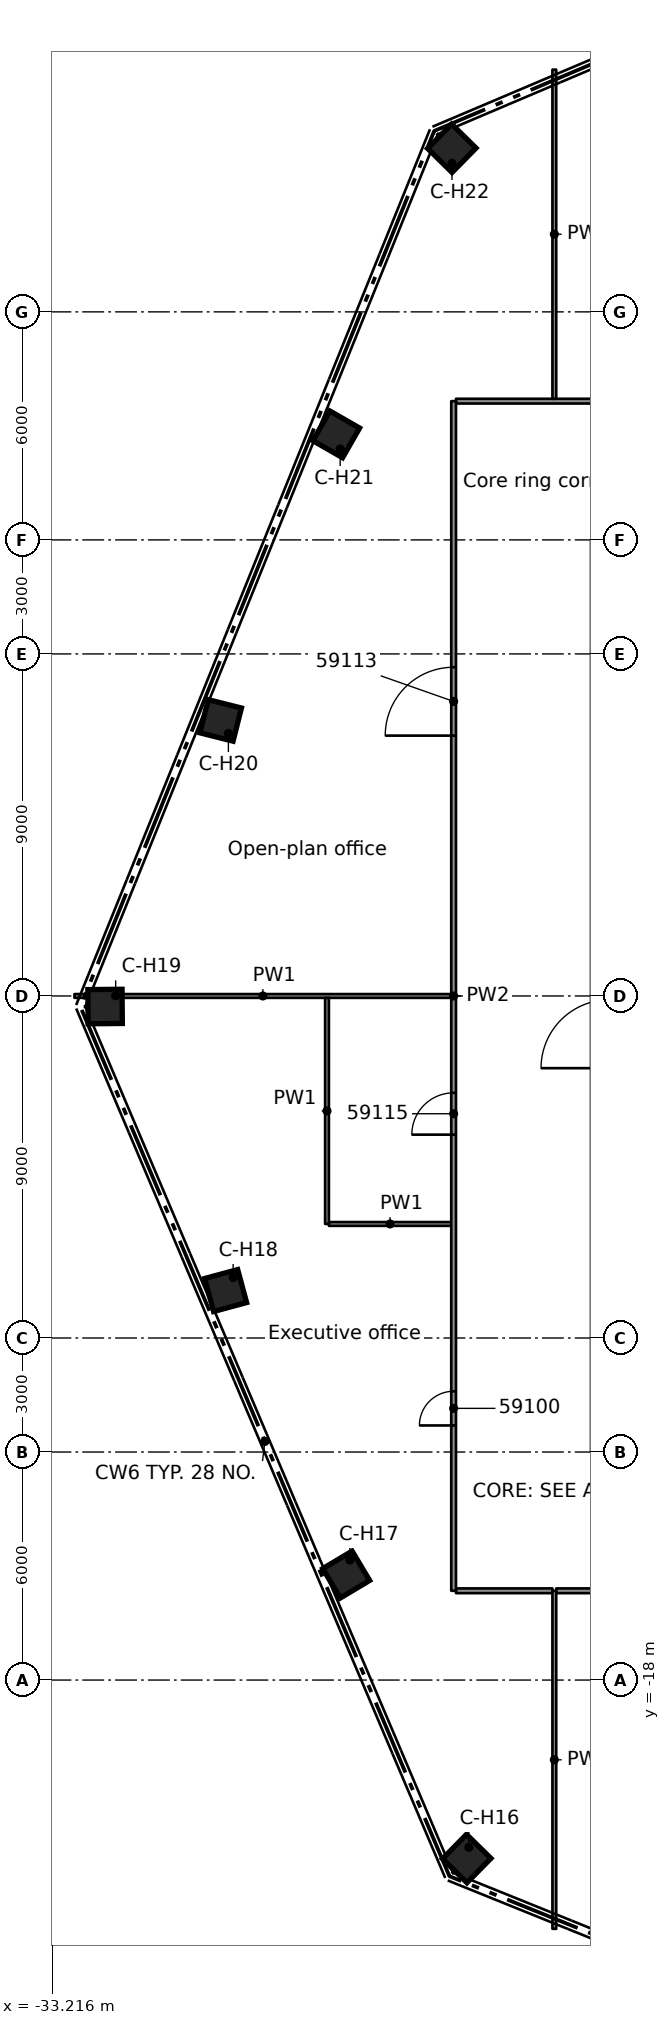
"""IFC4 building model, lengths in metres.
Left out: names, types, materials, properties, quantities, classifications, styles, units other than length and angle.
Written with IfcOpenShell. Run it as: python <this file> out.ifc"""

import sys

from ifc_helpers import new_model, si_unit, direction, frame, frame_2d, origin, origin_2d, place, context, subcontext, project, spatial, rectangle, extrude, element, fill, save


model = new_model("IFC4")
c1 = context("Model", 3, precision=1e-05, world=origin(), true_north=direction((0.0, 1.0)))
c2 = subcontext(c1, "Body", "Model", "MODEL_VIEW")
j1 = project(units=[si_unit("LENGTHUNIT", "METRE"), si_unit("PLANEANGLEUNIT", "RADIAN")], contexts=[c1])
p1 = place(None, origin())
s1 = spatial("IfcSite", under=j1, at=p1, CompositionType="ELEMENT")
p2 = place(p1, origin())
s2 = spatial("IfcBuilding", under=s1, at=p2, CompositionType="ELEMENT")
p3 = place(p2, frame((0.0, 0.0, 289.4)))
s3 = spatial("IfcBuildingStorey", under=s2, at=p3, CompositionType="ELEMENT", Elevation=289.4)
for number, where, z_axis, x_axis in (
    (1, (-22.305, -22.697, 0.0), (0.0, 0.0, 1.0), (-0.701, -0.713, 0.0)),
    (2, (-25.477, -15.224, 0.0), (0.0, 0.0, 1.0), (-0.858, -0.513, 0.0)),
    (3, (-28.649, -7.751, 0.0), (0.0, 0.0, 1.0), (-0.965, -0.261, 0.0)),
    (4, (-31.821, -0.278, 0.0), (0.0, 0.0, 1.0), (-1.0, -0.009, 0.0)),
    (5, (-28.78, 7.25, 0.0), (0.0, 0.0, 1.0), (-0.97, 0.244, 0.0)),
    (6, (-25.739, 14.777, 0.0), (0.0, 0.0, 1.0), (-0.867, 0.498, 0.0)),
    (7, (-22.697, 22.305, 0.0), (0.0, 0.0, 1.0), (-0.713, 0.701, 0.0)),
):
    element("IfcColumn", number, at=place(p3, frame(where, z_axis=z_axis, x_axis=x_axis)), inside=s3, PredefinedType="COLUMN", context=c2, shape_type="SweptSolid", body=[
        extrude(rectangle(XDim=0.9, YDim=0.9, at=origin_2d()), origin(), (0.0, 0.0, 1.0), 3.5),
    ])
p4 = place(p3, frame((-12.311, -15.651, 0.0), z_axis=(0.0, 0.0, 1.0), x_axis=(-1.0, 0.0, 0.0)))
e8 = element("IfcWall", 8, at=p4, inside=s3, PredefinedType="PARTITIONING", context=c2, shape_type="SweptSolid", body=[
    extrude(rectangle(XDim=7.639, YDim=0.125, at=frame_2d((3.819, 0.0))), origin(), (0.0, 0.0, 1.0), 3.15),
])
p5 = place(p4, frame((2.949, 0.0, 0.0)))
e9 = element("IfcOpeningElement", 9, at=p5, cuts=e8, PredefinedType="OPENING", context=c2, shape_type="SweptSolid", body=[
    extrude(rectangle(XDim=1.8, YDim=2.1, at=frame_2d((0.9, 1.05))), frame((0.0, 0.073, 0.0), z_axis=(0.0, -1.0, 0.0), x_axis=(1.0, 0.0, 0.0)), (0.0, 0.0, 1.0), 0.145),
])
p6 = place(p3, frame((-22.587, -15.651, 0.0), z_axis=(0.0, 0.0, 1.0), x_axis=(1.0, 0.0, 0.0)))
e10 = element("IfcWall", 10, at=p6, inside=s3, PredefinedType="PARTITIONING", context=c2, shape_type="SweptSolid", body=[
    extrude(rectangle(XDim=2.537, YDim=0.125, at=frame_2d((1.269, 0.0))), origin(), (0.0, 0.0, 1.0), 3.15),
])
p7 = place(p3, frame((-25.932, -5.999, 0.0), z_axis=(0.0, 0.0, 1.0), x_axis=(1.0, 0.0, 0.0)))
e11 = element("IfcWall", 11, at=p7, inside=s3, PredefinedType="PARTITIONING", context=c2, shape_type="SweptSolid", body=[
    extrude(rectangle(XDim=3.22, YDim=0.1, at=frame_2d((1.61, 0.0))), origin(), (0.0, 0.0, 1.0), 3.15),
])
p8 = place(p3, frame((-32.627, 0.0, 0.0), z_axis=(0.0, 0.0, 1.0), x_axis=(1.0, 0.0, 0.0)))
e12 = element("IfcWall", 12, at=p8, inside=s3, PredefinedType="PARTITIONING", context=c2, shape_type="SweptSolid", body=[
    extrude(rectangle(XDim=9.915, YDim=0.1, at=frame_2d((4.958, 0.0))), origin(), (0.0, 0.0, 1.0), 3.15),
])
p9 = place(p3, frame((-22.587, 15.651, 0.0), z_axis=(0.0, 0.0, 1.0), x_axis=(1.0, 0.0, 0.0)))
e13 = element("IfcWall", 13, at=p9, inside=s3, PredefinedType="PARTITIONING", context=c2, shape_type="SweptSolid", body=[
    extrude(rectangle(XDim=10.996, YDim=0.125, at=frame_2d((5.498, 0.0))), origin(), (0.0, 0.0, 1.0), 3.15),
])
p10 = place(p9, frame((5.938, 0.0, 0.0)))
e14 = element("IfcOpeningElement", 14, at=p10, cuts=e13, PredefinedType="OPENING", context=c2, shape_type="SweptSolid", body=[
    extrude(rectangle(XDim=1.8, YDim=2.1, at=frame_2d((0.9, 1.05))), frame((0.0, 0.073, 0.0), z_axis=(0.0, -1.0, 0.0), x_axis=(1.0, 0.0, 0.0)), (0.0, 0.0, 1.0), 0.145),
])
p11 = place(p3, frame((-20.0, -24.546, 0.0), z_axis=(0.0, 0.0, 1.0), x_axis=(0.0, 1.0, 0.0)))
e15 = element("IfcWall", 15, at=p11, inside=s3, PredefinedType="PARTITIONING", context=c2, shape_type="SweptSolid", body=[
    extrude(rectangle(XDim=8.895, YDim=0.1, at=frame_2d((4.448, 0.0))), origin(), (0.0, 0.0, 1.0), 3.15),
])
p12 = place(p3, frame((-20.0, 15.713, 0.0), z_axis=(0.0, 0.0, 1.0), x_axis=(0.0, 1.0, 0.0)))
e16 = element("IfcWall", 16, at=p12, inside=s3, PredefinedType="PARTITIONING", context=c2, shape_type="SweptSolid", body=[
    extrude(rectangle(XDim=8.661, YDim=0.1, at=frame_2d((4.331, 0.0))), origin(), (0.0, 0.0, 1.0), 3.15),
])
p13 = place(p3, frame((-22.65, -15.651, 0.0), z_axis=(0.0, 0.0, 1.0), x_axis=(0.0, 1.0, 0.0)))
e17 = element("IfcWall", 17, at=p13, inside=s3, PredefinedType="PARTITIONING", context=c2, shape_type="SweptSolid", body=[
    extrude(rectangle(XDim=31.302, YDim=0.125, at=frame_2d((15.651, 0.0))), origin(), (0.0, 0.0, 1.0), 3.15),
])
p14 = place(p13, frame((4.35, 0.0, 0.0)))
e18 = element("IfcOpeningElement", 18, at=p14, cuts=e17, PredefinedType="OPENING", context=c2, shape_type="SweptSolid", body=[
    extrude(rectangle(XDim=0.9, YDim=2.1, at=frame_2d((0.45, 1.05))), frame((0.0, 0.073, 0.0), z_axis=(0.0, -1.0, 0.0), x_axis=(1.0, 0.0, 0.0)), (0.0, 0.0, 1.0), 0.145),
])
p15 = place(p13, frame((22.501, 0.0, 0.0)))
e19 = element("IfcOpeningElement", 19, at=p15, cuts=e17, PredefinedType="OPENING", context=c2, shape_type="SweptSolid", body=[
    extrude(rectangle(XDim=1.8, YDim=2.1, at=frame_2d((0.9, 1.05))), frame((0.0, 0.073, 0.0), z_axis=(0.0, -1.0, 0.0), x_axis=(1.0, 0.0, 0.0)), (0.0, 0.0, 1.0), 0.145),
])
p16 = place(p13, frame((12.002, 0.0, 0.0)))
e20 = element("IfcOpeningElement", 20, at=p16, cuts=e17, PredefinedType="OPENING", context=c2, shape_type="SweptSolid", body=[
    extrude(rectangle(XDim=1.1, YDim=2.1, at=frame_2d((0.55, 1.05))), frame((0.0, 0.073, 0.0), z_axis=(0.0, -1.0, 0.0), x_axis=(1.0, 0.0, 0.0)), (0.0, 0.0, 1.0), 0.145),
])
p17 = place(p3, frame((-25.982, -5.999, 0.0), z_axis=(0.0, 0.0, 1.0), x_axis=(0.0, 1.0, 0.0)))
e21 = element("IfcWall", 21, at=p17, inside=s3, PredefinedType="PARTITIONING", context=c2, shape_type="SweptSolid", body=[
    extrude(rectangle(XDim=5.949, YDim=0.1, at=frame_2d((2.975, 0.0))), origin(), (0.0, 0.0, 1.0), 3.15),
])
p18 = place(p14, origin())
e22 = element("IfcDoor", 22, at=p18, inside=s3, OperationType="SINGLE_SWING_LEFT", PredefinedType="DOOR", context=c2, shape_type="SweptSolid", body=[
    extrude(rectangle(XDim=0.9, YDim=2.1, at=frame_2d((0.45, 1.05))), frame((0.0, 0.025, 0.0), z_axis=(0.0, -1.0, 0.0), x_axis=(1.0, 0.0, 0.0)), (0.0, 0.0, 1.0), 0.05),
])
fill(e18, e22)
p19 = place(p15, origin())
e23 = element("IfcDoor", 23, at=p19, inside=s3, OperationType="DOUBLE_DOOR_SINGLE_SWING", PredefinedType="DOOR", context=c2, shape_type="SweptSolid", body=[
    extrude(rectangle(XDim=1.8, YDim=2.1, at=frame_2d((0.9, 1.05))), frame((0.0, 0.025, 0.0), z_axis=(0.0, -1.0, 0.0), x_axis=(1.0, 0.0, 0.0)), (0.0, 0.0, 1.0), 0.05),
])
fill(e19, e23)
p20 = place(p16, origin())
e24 = element("IfcDoor", 24, at=p20, inside=s3, OperationType="SINGLE_SWING_LEFT", PredefinedType="DOOR", context=c2, shape_type="SweptSolid", body=[
    extrude(rectangle(XDim=1.1, YDim=2.1, at=frame_2d((0.55, 1.05))), frame((0.0, 0.025, 0.0), z_axis=(0.0, -1.0, 0.0), x_axis=(1.0, 0.0, 0.0)), (0.0, 0.0, 1.0), 0.05),
])
fill(e20, e24)
save(model, sys.argv[1])
